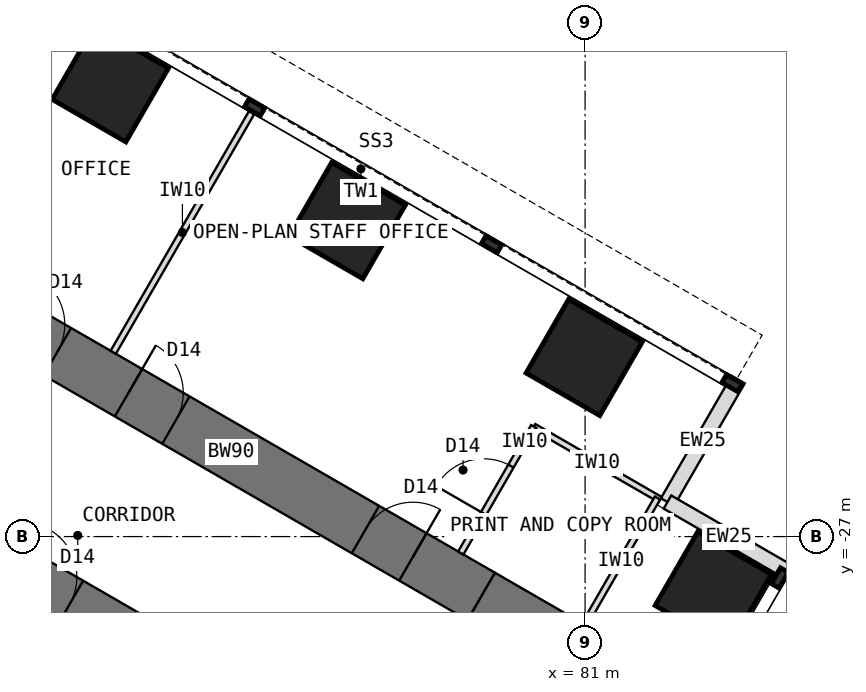
"""IFC4 building model, lengths in metres.
Left out: names, types, materials, properties, quantities, classifications, styles, units other than length and angle.
Written with IfcOpenShell. Run it as: python <this file> out.ifc"""

import sys

from ifc_helpers import new_model, si_unit, direction, frame, frame_2d, origin, origin_2d, place, context, subcontext, project, spatial, rectangle, extrude, element, fill, save


model = new_model("IFC4")
c1 = context("Model", 3, precision=1e-05, world=origin(), true_north=direction((0.0, 1.0)))
c2 = subcontext(c1, "Body", "Model", "MODEL_VIEW")
j1 = project(units=[si_unit("LENGTHUNIT", "METRE"), si_unit("PLANEANGLEUNIT", "RADIAN")], contexts=[c1])
p1 = place(None, origin())
s1 = spatial("IfcSite", under=j1, at=p1, CompositionType="ELEMENT")
p2 = place(p1, origin())
s2 = spatial("IfcBuilding", under=s1, at=p2, CompositionType="ELEMENT")
p3 = place(p2, frame((0.0, 0.0, 80.5)))
s3 = spatial("IfcBuildingStorey", under=s2, at=p3, CompositionType="ELEMENT", Elevation=80.5)
p4 = place(p3, frame((71.066, -23.234, 0.0), z_axis=(0.0, 0.0, 1.0), x_axis=(0.86602681393, -0.499997557548, 0.0)))
e1 = element("IfcWall", 1, at=p4, inside=s3, PredefinedType="SHEAR", context=c2, shape_type="SweptSolid", body=[
    extrude(rectangle(XDim=9.5, YDim=0.9, at=frame_2d((4.75, 0.0))), origin(), (0.0, 0.0, 1.0), 4.0),
])
p5 = place(p4, frame((0.55, 0.0, 0.0)))
e2 = element("IfcOpeningElement", 2, at=p5, cuts=e1, PredefinedType="OPENING", context=c2, shape_type="SweptSolid", body=[
    extrude(rectangle(XDim=0.9, YDim=2.1, at=frame_2d((0.45, 1.05))), frame((0.0, 0.46, 0.0), z_axis=(0.0, -1.0, 0.0), x_axis=(1.0, 0.0, 0.0)), (0.0, 0.0, 1.0), 0.92),
])
p6 = place(p4, frame((2.8, 0.0, 0.0)))
e3 = element("IfcOpeningElement", 3, at=p6, cuts=e1, PredefinedType="OPENING", context=c2, shape_type="SweptSolid", body=[
    extrude(rectangle(XDim=0.9, YDim=2.1, at=frame_2d((0.45, 1.05))), frame((0.0, 0.46, 0.0), z_axis=(0.0, -1.0, 0.0), x_axis=(1.0, 0.0, 0.0)), (0.0, 0.0, 1.0), 0.92),
])
p7 = place(p4, frame((7.3, 0.0, 0.0)))
e4 = element("IfcOpeningElement", 4, at=p7, cuts=e1, PredefinedType="OPENING", context=c2, shape_type="SweptSolid", body=[
    extrude(rectangle(XDim=0.9, YDim=2.1, at=frame_2d((0.45, 1.05))), frame((0.0, 0.46, 0.0), z_axis=(0.0, -1.0, 0.0), x_axis=(1.0, 0.0, 0.0)), (0.0, 0.0, 1.0), 0.92),
])
p8 = place(p3, frame((79.294, -27.984, 0.0), z_axis=(0.0, 0.0, 1.0), x_axis=(0.866000971088, -0.500042316284, 0.0)))
e5 = element("IfcWall", 5, at=p8, inside=s3, PredefinedType="SHEAR", context=c2, shape_type="SweptSolid", body=[
    extrude(rectangle(XDim=3.7, YDim=0.9, at=frame_2d((1.85, 0.0))), origin(), (0.0, 0.0, 1.0), 4.0),
])
p9 = place(p3, frame((69.316, -26.266, 0.0), z_axis=(0.0, 0.0, 1.0), x_axis=(0.86602681393, -0.499997557548, 0.0)))
e6 = element("IfcWall", 6, at=p9, inside=s3, PredefinedType="SHEAR", context=c2, shape_type="SweptSolid", body=[
    extrude(rectangle(XDim=9.5, YDim=0.9, at=frame_2d((4.75, 0.0))), origin(), (0.0, 0.0, 1.0), 4.0),
])
p10 = place(p9, frame((0.55, 0.0, 0.0)))
e7 = element("IfcOpeningElement", 7, at=p10, cuts=e6, PredefinedType="OPENING", context=c2, shape_type="SweptSolid", body=[
    extrude(rectangle(XDim=0.9, YDim=2.1, at=frame_2d((0.45, 1.05))), frame((0.0, 0.46, 0.0), z_axis=(0.0, -1.0, 0.0), x_axis=(1.0, 0.0, 0.0)), (0.0, 0.0, 1.0), 0.92),
])
p11 = place(p9, frame((2.8, 0.0, 0.0)))
e8 = element("IfcOpeningElement", 8, at=p11, cuts=e6, PredefinedType="OPENING", context=c2, shape_type="SweptSolid", body=[
    extrude(rectangle(XDim=0.9, YDim=2.1, at=frame_2d((0.45, 1.05))), frame((0.0, 0.46, 0.0), z_axis=(0.0, -1.0, 0.0), x_axis=(1.0, 0.0, 0.0)), (0.0, 0.0, 1.0), 0.92),
])
p12 = place(p9, frame((7.3, 0.0, 0.0)))
e9 = element("IfcOpeningElement", 9, at=p12, cuts=e6, PredefinedType="OPENING", context=c2, shape_type="SweptSolid", body=[
    extrude(rectangle(XDim=0.9, YDim=2.1, at=frame_2d((0.45, 1.05))), frame((0.0, 0.46, 0.0), z_axis=(0.0, -1.0, 0.0), x_axis=(1.0, 0.0, 0.0)), (0.0, 0.0, 1.0), 0.92),
])
for number, where, z_axis, x_axis in (
    (10, (73.191, -19.554, 0.0), (0.0, 0.0, 1.0), (0.5, 0.866, 0.0)),
    (11, (77.088, -21.804, 0.0), (0.0, 0.0, 1.0), (0.5, 0.866, 0.0)),
    (12, (80.986, -24.054, 0.0), (0.0, 0.0, 1.0), (0.5, 0.866, 0.0)),
    (13, (83.108, -27.877, 0.0), (0.0, 0.0, 1.0), (0.5, 0.866, 0.0)),
):
    element("IfcColumn", number, at=place(p3, frame(where, z_axis=z_axis, x_axis=x_axis)), inside=s3, PredefinedType="COLUMN", context=c2, shape_type="SweptSolid", body=[
        extrude(rectangle(XDim=1.4, YDim=1.4, at=origin_2d()), origin(), (0.0, 0.0, 1.0), 4.0),
    ])
for number, where, z_axis, x_axis in (
    (14, (83.517, -24.419, 0.0), (0.0, 0.0, 1.0), (-0.5, -0.866, 0.0)),
    (15, (82.355, -26.432, 0.0), (0.0, 0.0, 1.0), (0.866, -0.5, 0.0)),
):
    element("IfcWall", number, at=place(p3, frame(where, z_axis=z_axis, x_axis=x_axis)), inside=s3, PredefinedType="STANDARD", context=c2, shape_type="SweptSolid", body=[
        extrude(rectangle(XDim=2.325, YDim=0.25, at=frame_2d((1.163, 0.0))), origin(), (0.0, 0.0, 1.0), 3.8),
    ])
p13 = place(p3, frame((73.24, -23.97, 0.0), z_axis=(0.0, 0.0, 1.0), x_axis=(0.499982560684, 0.866035472144, 0.0)))
e16 = element("IfcWall", 16, at=p13, inside=s3, PredefinedType="PARTITIONING", context=c2, shape_type="SweptSolid", body=[
    extrude(rectangle(XDim=4.55, YDim=0.1, at=frame_2d((2.275, 0.0))), origin(), (0.0, 0.0, 1.0), 3.8),
])
p14 = place(p3, frame((80.156, -25.191, 0.0), z_axis=(0.0, 0.0, 1.0), x_axis=(0.865980596518, -0.500077600433, 0.0)))
e17 = element("IfcWall", 17, at=p14, inside=s3, PredefinedType="PARTITIONING", context=c2, shape_type="SweptSolid", body=[
    extrude(rectangle(XDim=2.4, YDim=0.1, at=frame_2d((1.2, 0.0))), origin(), (0.0, 0.0, 1.0), 3.8),
])
p15 = place(p3, frame((78.956, -27.27, 0.0), z_axis=(0.0, 0.0, 1.0), x_axis=(0.500033551112, 0.866006032174, 0.0)))
e18 = element("IfcWall", 18, at=p15, inside=s3, PredefinedType="PARTITIONING", context=c2, shape_type="SweptSolid", body=[
    extrude(rectangle(XDim=2.4, YDim=0.1, at=frame_2d((1.2, 0.0))), origin(), (0.0, 0.0, 1.0), 3.8),
])
p16 = place(p15, frame((0.75, 0.0, 0.0)))
e19 = element("IfcOpeningElement", 19, at=p16, cuts=e18, PredefinedType="OPENING", context=c2, shape_type="SweptSolid", body=[
    extrude(rectangle(XDim=0.9, YDim=2.1, at=frame_2d((0.45, 1.05))), frame((0.0, 0.06, 0.0), z_axis=(0.0, -1.0, 0.0), x_axis=(1.0, 0.0, 0.0)), (0.0, 0.0, 1.0), 0.12),
])
p17 = place(p3, frame((80.991, -28.445, 0.0), z_axis=(0.0, 0.0, 1.0), x_axis=(0.500033551112, 0.866006032174, 0.0)))
e20 = element("IfcWall", 20, at=p17, inside=s3, PredefinedType="PARTITIONING", context=c2, shape_type="SweptSolid", body=[
    extrude(rectangle(XDim=2.4, YDim=0.1, at=frame_2d((1.2, 0.0))), origin(), (0.0, 0.0, 1.0), 3.8),
])
p18 = place(p16, origin())
e21 = element("IfcDoor", 21, at=p18, inside=s3, OperationType="SINGLE_SWING_LEFT", PredefinedType="DOOR", context=c2, shape_type="SweptSolid", body=[
    extrude(rectangle(XDim=0.9, YDim=2.1, at=frame_2d((0.45, 1.05))), frame((0.0, 0.025, 0.0), z_axis=(0.0, -1.0, 0.0), x_axis=(1.0, 0.0, 0.0)), (0.0, 0.0, 1.0), 0.05),
])
fill(e19, e21)
p19 = place(p5, origin())
e22 = element("IfcDoor", 22, at=p19, inside=s3, OperationType="SINGLE_SWING_LEFT", PredefinedType="DOOR", context=c2, shape_type="SweptSolid", body=[
    extrude(rectangle(XDim=0.82, YDim=2.06, at=frame_2d((0.45, 1.03))), frame((0.0, 0.025, 0.0), z_axis=(0.0, -1.0, 0.0), x_axis=(1.0, 0.0, 0.0)), (0.0, 0.0, 1.0), 0.05),
    extrude(rectangle(XDim=0.04, YDim=2.1, at=frame_2d((0.02, 1.05))), frame((0.0, 0.45, 0.0), z_axis=(0.0, -1.0, 0.0), x_axis=(1.0, 0.0, 0.0)), (0.0, 0.0, 1.0), 0.899),
    extrude(rectangle(XDim=0.04, YDim=2.1, at=frame_2d((0.88, 1.05))), frame((0.0, 0.45, 0.0), z_axis=(0.0, -1.0, 0.0), x_axis=(1.0, 0.0, 0.0)), (0.0, 0.0, 1.0), 0.899),
    extrude(rectangle(XDim=0.82, YDim=0.04, at=frame_2d((0.45, 2.08))), frame((0.0, 0.45, 0.0), z_axis=(0.0, -1.0, 0.0), x_axis=(1.0, 0.0, 0.0)), (0.0, 0.0, 1.0), 0.899),
])
fill(e2, e22)
p20 = place(p6, origin())
e23 = element("IfcDoor", 23, at=p20, inside=s3, OperationType="SINGLE_SWING_LEFT", PredefinedType="DOOR", context=c2, shape_type="SweptSolid", body=[
    extrude(rectangle(XDim=0.82, YDim=2.06, at=frame_2d((0.45, 1.03))), frame((0.0, 0.025, 0.0), z_axis=(0.0, -1.0, 0.0), x_axis=(1.0, 0.0, 0.0)), (0.0, 0.0, 1.0), 0.05),
    extrude(rectangle(XDim=0.04, YDim=2.1, at=frame_2d((0.02, 1.05))), frame((0.0, 0.45, 0.0), z_axis=(0.0, -1.0, 0.0), x_axis=(1.0, 0.0, 0.0)), (0.0, 0.0, 1.0), 0.899),
    extrude(rectangle(XDim=0.04, YDim=2.1, at=frame_2d((0.88, 1.05))), frame((0.0, 0.45, 0.0), z_axis=(0.0, -1.0, 0.0), x_axis=(1.0, 0.0, 0.0)), (0.0, 0.0, 1.0), 0.899),
    extrude(rectangle(XDim=0.82, YDim=0.04, at=frame_2d((0.45, 2.08))), frame((0.0, 0.45, 0.0), z_axis=(0.0, -1.0, 0.0), x_axis=(1.0, 0.0, 0.0)), (0.0, 0.0, 1.0), 0.899),
])
fill(e3, e23)
p21 = place(p7, origin())
e24 = element("IfcDoor", 24, at=p21, inside=s3, OperationType="SINGLE_SWING_RIGHT", PredefinedType="DOOR", context=c2, shape_type="SweptSolid", body=[
    extrude(rectangle(XDim=0.82, YDim=2.06, at=frame_2d((0.45, 1.03))), frame((0.0, 0.025, 0.0), z_axis=(0.0, -1.0, 0.0), x_axis=(1.0, 0.0, 0.0)), (0.0, 0.0, 1.0), 0.05),
    extrude(rectangle(XDim=0.04, YDim=2.1, at=frame_2d((0.02, 1.05))), frame((0.0, 0.45, 0.0), z_axis=(0.0, -1.0, 0.0), x_axis=(1.0, 0.0, 0.0)), (0.0, 0.0, 1.0), 0.899),
    extrude(rectangle(XDim=0.04, YDim=2.1, at=frame_2d((0.88, 1.05))), frame((0.0, 0.45, 0.0), z_axis=(0.0, -1.0, 0.0), x_axis=(1.0, 0.0, 0.0)), (0.0, 0.0, 1.0), 0.899),
    extrude(rectangle(XDim=0.82, YDim=0.04, at=frame_2d((0.45, 2.08))), frame((0.0, 0.45, 0.0), z_axis=(0.0, -1.0, 0.0), x_axis=(1.0, 0.0, 0.0)), (0.0, 0.0, 1.0), 0.899),
])
fill(e4, e24)
p22 = place(p11, origin())
e25 = element("IfcDoor", 25, at=p22, inside=s3, OperationType="SINGLE_SWING_LEFT", PredefinedType="DOOR", context=c2, shape_type="SweptSolid", body=[
    extrude(rectangle(XDim=0.82, YDim=2.06, at=frame_2d((0.45, 1.03))), frame((0.0, 0.025, 0.0), z_axis=(0.0, -1.0, 0.0), x_axis=(1.0, 0.0, 0.0)), (0.0, 0.0, 1.0), 0.05),
    extrude(rectangle(XDim=0.04, YDim=2.1, at=frame_2d((0.02, 1.05))), frame((0.0, 0.45, 0.0), z_axis=(0.0, -1.0, 0.0), x_axis=(1.0, 0.0, 0.0)), (0.0, 0.0, 1.0), 0.899),
    extrude(rectangle(XDim=0.04, YDim=2.1, at=frame_2d((0.88, 1.05))), frame((0.0, 0.45, 0.0), z_axis=(0.0, -1.0, 0.0), x_axis=(1.0, 0.0, 0.0)), (0.0, 0.0, 1.0), 0.899),
    extrude(rectangle(XDim=0.82, YDim=0.04, at=frame_2d((0.45, 2.08))), frame((0.0, 0.45, 0.0), z_axis=(0.0, -1.0, 0.0), x_axis=(1.0, 0.0, 0.0)), (0.0, 0.0, 1.0), 0.899),
])
fill(e8, e25)
save(model, sys.argv[1])
